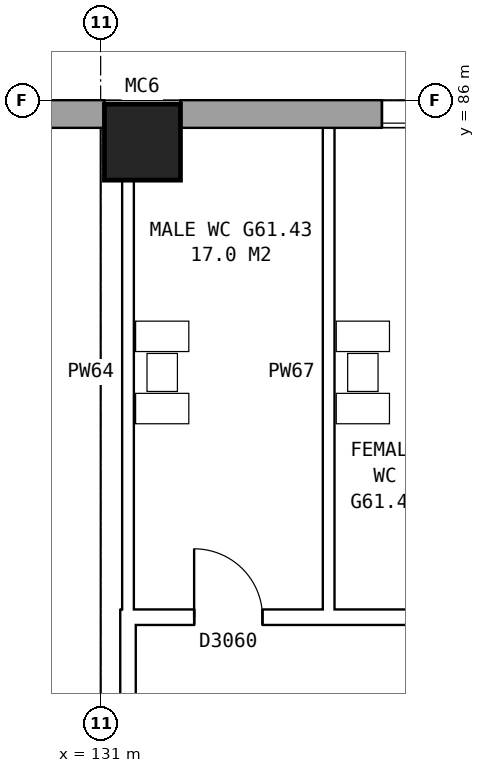
"""IFC4 building model, lengths in metres.
Left out: names, types, materials, properties, quantities, classifications, styles, units other than length and angle.
Written with IfcOpenShell. Run it as: python <this file> out.ifc"""

import sys

from ifc_helpers import new_model, si_unit, direction, frame, frame_2d, origin, origin_2d, place, context, subcontext, project, spatial, rectangle, hollow_rectangle, extrude, element, fill, save


model = new_model("IFC4")
c1 = context("Model", 3, precision=1e-05, world=origin(), true_north=direction((0.0, 1.0)))
c2 = subcontext(c1, "Body", "Model", "MODEL_VIEW")
j1 = project(units=[si_unit("LENGTHUNIT", "METRE"), si_unit("PLANEANGLEUNIT", "RADIAN")], contexts=[c1])
p1 = place(None, origin())
s1 = spatial("IfcSite", under=j1, at=p1, CompositionType="ELEMENT")
p2 = place(p1, origin())
s2 = spatial("IfcBuilding", under=s1, at=p2, CompositionType="ELEMENT")
p3 = place(p2, frame((0.0, 0.0, 215.2)))
s3 = spatial("IfcBuildingStorey", under=s2, at=p3, CompositionType="ELEMENT", Elevation=215.2)
p4 = place(p3, frame((131.55, 85.45, 0.0), z_axis=(0.0, 0.0, 1.0), x_axis=(1.0, 0.0, 0.0)))
e1 = element("IfcColumn", 1, at=p4, inside=s3, PredefinedType="COLUMN", context=c2, shape_type="SweptSolid", body=[
    extrude(hollow_rectangle(XDim=1.0, YDim=1.0, WallThickness=0.055, at=origin_2d()), origin(), (0.0, 0.0, 1.0), 6.2),
])
p5 = place(p3, frame((165.925, 85.82, 0.0), z_axis=(0.0, 0.0, 1.0), x_axis=(-1.0, 0.0, 0.0)))
e2 = element("IfcWall", 2, at=p5, inside=s3, PredefinedType="STANDARD", context=c2, shape_type="SweptSolid", body=[
    extrude(rectangle(XDim=33.875, YDim=0.36, at=frame_2d((16.938, 0.0))), origin(), (0.0, 0.0, 1.0), 5.6),
])
p6 = place(p5, frame((0.3, 0.0, 0.15)))
e3 = element("IfcOpeningElement", 3, at=p6, cuts=e2, PredefinedType="OPENING", context=c2, shape_type="SweptSolid", body=[
    extrude(rectangle(XDim=1.6, YDim=2.4, at=frame_2d((0.8, 1.2))), frame((0.0, 0.19, 0.0), z_axis=(0.0, -1.0, 0.0), x_axis=(1.0, 0.0, 0.0)), (0.0, 0.0, 1.0), 0.38),
])
p7 = place(p5, frame((2.2, 0.0, 0.15)))
e4 = element("IfcOpeningElement", 4, at=p7, cuts=e2, PredefinedType="OPENING", context=c2, shape_type="SweptSolid", body=[
    extrude(rectangle(XDim=1.6, YDim=2.4, at=frame_2d((0.8, 1.2))), frame((0.0, 0.19, 0.0), z_axis=(0.0, -1.0, 0.0), x_axis=(1.0, 0.0, 0.0)), (0.0, 0.0, 1.0), 0.38),
])
p8 = place(p5, frame((8.625, 0.0, 0.15)))
e5 = element("IfcOpeningElement", 5, at=p8, cuts=e2, PredefinedType="OPENING", context=c2, shape_type="SweptSolid", body=[
    extrude(rectangle(XDim=1.6, YDim=2.4, at=frame_2d((0.8, 1.2))), frame((0.0, 0.19, 0.0), z_axis=(0.0, -1.0, 0.0), x_axis=(1.0, 0.0, 0.0)), (0.0, 0.0, 1.0), 0.38),
])
p9 = place(p5, frame((11.625, 0.0, 0.15)))
e6 = element("IfcOpeningElement", 6, at=p9, cuts=e2, PredefinedType="OPENING", context=c2, shape_type="SweptSolid", body=[
    extrude(rectangle(XDim=1.6, YDim=2.4, at=frame_2d((0.8, 1.2))), frame((0.0, 0.19, 0.0), z_axis=(0.0, -1.0, 0.0), x_axis=(1.0, 0.0, 0.0)), (0.0, 0.0, 1.0), 0.38),
])
p10 = place(p5, frame((14.625, 0.0, 0.15)))
e7 = element("IfcOpeningElement", 7, at=p10, cuts=e2, PredefinedType="OPENING", context=c2, shape_type="SweptSolid", body=[
    extrude(rectangle(XDim=1.6, YDim=2.4, at=frame_2d((0.8, 1.2))), frame((0.0, 0.19, 0.0), z_axis=(0.0, -1.0, 0.0), x_axis=(1.0, 0.0, 0.0)), (0.0, 0.0, 1.0), 0.38),
])
p11 = place(p5, frame((17.625, 0.0, 0.15)))
e8 = element("IfcOpeningElement", 8, at=p11, cuts=e2, PredefinedType="OPENING", context=c2, shape_type="SweptSolid", body=[
    extrude(rectangle(XDim=1.6, YDim=2.4, at=frame_2d((0.8, 1.2))), frame((0.0, 0.19, 0.0), z_axis=(0.0, -1.0, 0.0), x_axis=(1.0, 0.0, 0.0)), (0.0, 0.0, 1.0), 0.38),
])
p12 = place(p5, frame((20.625, 0.0, 0.15)))
e9 = element("IfcOpeningElement", 9, at=p12, cuts=e2, PredefinedType="OPENING", context=c2, shape_type="SweptSolid", body=[
    extrude(rectangle(XDim=1.6, YDim=2.4, at=frame_2d((0.8, 1.2))), frame((0.0, 0.19, 0.0), z_axis=(0.0, -1.0, 0.0), x_axis=(1.0, 0.0, 0.0)), (0.0, 0.0, 1.0), 0.38),
])
p13 = place(p5, frame((23.625, 0.0, 0.15)))
e10 = element("IfcOpeningElement", 10, at=p13, cuts=e2, PredefinedType="OPENING", context=c2, shape_type="SweptSolid", body=[
    extrude(rectangle(XDim=1.6, YDim=2.4, at=frame_2d((0.8, 1.2))), frame((0.0, 0.19, 0.0), z_axis=(0.0, -1.0, 0.0), x_axis=(1.0, 0.0, 0.0)), (0.0, 0.0, 1.0), 0.38),
])
p14 = place(p5, frame((29.625, 0.0, 0.15)))
e11 = element("IfcOpeningElement", 11, at=p14, cuts=e2, PredefinedType="OPENING", context=c2, shape_type="SweptSolid", body=[
    extrude(rectangle(XDim=1.6, YDim=2.4, at=frame_2d((0.8, 1.2))), frame((0.0, 0.19, 0.0), z_axis=(0.0, -1.0, 0.0), x_axis=(1.0, 0.0, 0.0)), (0.0, 0.0, 1.0), 0.38),
])
p15 = place(p5, frame((6.25, 0.0, 0.15)))
e12 = element("IfcOpeningElement", 12, at=p15, cuts=e2, PredefinedType="OPENING", context=c2, shape_type="SweptSolid", body=[
    extrude(rectangle(XDim=0.9, YDim=2.4, at=frame_2d((0.45, 1.2))), frame((0.0, 0.19, 0.0), z_axis=(0.0, -1.0, 0.0), x_axis=(1.0, 0.0, 0.0)), (0.0, 0.0, 1.0), 0.38),
])
p16 = place(p3, frame((131.05, 85.82, 0.0), z_axis=(0.0, 0.0, 1.0), x_axis=(-1.0, 0.0, 0.0)))
e13 = element("IfcWall", 13, at=p16, inside=s3, PredefinedType="STANDARD", context=c2, shape_type="SweptSolid", body=[
    extrude(rectangle(XDim=55.1, YDim=0.36, at=frame_2d((27.55, 0.0))), origin(), (0.0, 0.0, 1.0), 5.6),
])
p17 = place(p16, frame((0.969, 0.0, 0.15)))
e14 = element("IfcOpeningElement", 14, at=p17, cuts=e13, PredefinedType="OPENING", context=c2, shape_type="SweptSolid", body=[
    extrude(rectangle(XDim=1.6, YDim=2.4, at=frame_2d((0.8, 1.2))), frame((0.0, 0.19, 0.0), z_axis=(0.0, -1.0, 0.0), x_axis=(1.0, 0.0, 0.0)), (0.0, 0.0, 1.0), 0.38),
])
p18 = place(p16, frame((4.406, 0.0, 0.15)))
e15 = element("IfcOpeningElement", 15, at=p18, cuts=e13, PredefinedType="OPENING", context=c2, shape_type="SweptSolid", body=[
    extrude(rectangle(XDim=1.6, YDim=2.4, at=frame_2d((0.8, 1.2))), frame((0.0, 0.19, 0.0), z_axis=(0.0, -1.0, 0.0), x_axis=(1.0, 0.0, 0.0)), (0.0, 0.0, 1.0), 0.38),
])
p19 = place(p16, frame((7.844, 0.0, 0.15)))
e16 = element("IfcOpeningElement", 16, at=p19, cuts=e13, PredefinedType="OPENING", context=c2, shape_type="SweptSolid", body=[
    extrude(rectangle(XDim=1.6, YDim=2.4, at=frame_2d((0.8, 1.2))), frame((0.0, 0.19, 0.0), z_axis=(0.0, -1.0, 0.0), x_axis=(1.0, 0.0, 0.0)), (0.0, 0.0, 1.0), 0.38),
])
p20 = place(p16, frame((11.281, 0.0, 0.15)))
e17 = element("IfcOpeningElement", 17, at=p20, cuts=e13, PredefinedType="OPENING", context=c2, shape_type="SweptSolid", body=[
    extrude(rectangle(XDim=1.6, YDim=2.4, at=frame_2d((0.8, 1.2))), frame((0.0, 0.19, 0.0), z_axis=(0.0, -1.0, 0.0), x_axis=(1.0, 0.0, 0.0)), (0.0, 0.0, 1.0), 0.38),
])
p21 = place(p16, frame((14.719, 0.0, 0.15)))
e18 = element("IfcOpeningElement", 18, at=p21, cuts=e13, PredefinedType="OPENING", context=c2, shape_type="SweptSolid", body=[
    extrude(rectangle(XDim=1.6, YDim=2.4, at=frame_2d((0.8, 1.2))), frame((0.0, 0.19, 0.0), z_axis=(0.0, -1.0, 0.0), x_axis=(1.0, 0.0, 0.0)), (0.0, 0.0, 1.0), 0.38),
])
p22 = place(p16, frame((18.156, 0.0, 0.15)))
e19 = element("IfcOpeningElement", 19, at=p22, cuts=e13, PredefinedType="OPENING", context=c2, shape_type="SweptSolid", body=[
    extrude(rectangle(XDim=1.6, YDim=2.4, at=frame_2d((0.8, 1.2))), frame((0.0, 0.19, 0.0), z_axis=(0.0, -1.0, 0.0), x_axis=(1.0, 0.0, 0.0)), (0.0, 0.0, 1.0), 0.38),
])
p23 = place(p16, frame((21.594, 0.0, 0.15)))
e20 = element("IfcOpeningElement", 20, at=p23, cuts=e13, PredefinedType="OPENING", context=c2, shape_type="SweptSolid", body=[
    extrude(rectangle(XDim=1.6, YDim=2.4, at=frame_2d((0.8, 1.2))), frame((0.0, 0.19, 0.0), z_axis=(0.0, -1.0, 0.0), x_axis=(1.0, 0.0, 0.0)), (0.0, 0.0, 1.0), 0.38),
])
p24 = place(p16, frame((25.031, 0.0, 0.15)))
e21 = element("IfcOpeningElement", 21, at=p24, cuts=e13, PredefinedType="OPENING", context=c2, shape_type="SweptSolid", body=[
    extrude(rectangle(XDim=1.6, YDim=2.4, at=frame_2d((0.8, 1.2))), frame((0.0, 0.19, 0.0), z_axis=(0.0, -1.0, 0.0), x_axis=(1.0, 0.0, 0.0)), (0.0, 0.0, 1.0), 0.38),
])
p25 = place(p16, frame((28.469, 0.0, 0.15)))
e22 = element("IfcOpeningElement", 22, at=p25, cuts=e13, PredefinedType="OPENING", context=c2, shape_type="SweptSolid", body=[
    extrude(rectangle(XDim=1.6, YDim=2.4, at=frame_2d((0.8, 1.2))), frame((0.0, 0.19, 0.0), z_axis=(0.0, -1.0, 0.0), x_axis=(1.0, 0.0, 0.0)), (0.0, 0.0, 1.0), 0.38),
])
p26 = place(p16, frame((31.906, 0.0, 0.15)))
e23 = element("IfcOpeningElement", 23, at=p26, cuts=e13, PredefinedType="OPENING", context=c2, shape_type="SweptSolid", body=[
    extrude(rectangle(XDim=1.6, YDim=2.4, at=frame_2d((0.8, 1.2))), frame((0.0, 0.19, 0.0), z_axis=(0.0, -1.0, 0.0), x_axis=(1.0, 0.0, 0.0)), (0.0, 0.0, 1.0), 0.38),
])
p27 = place(p16, frame((35.344, 0.0, 0.15)))
e24 = element("IfcOpeningElement", 24, at=p27, cuts=e13, PredefinedType="OPENING", context=c2, shape_type="SweptSolid", body=[
    extrude(rectangle(XDim=1.6, YDim=2.4, at=frame_2d((0.8, 1.2))), frame((0.0, 0.19, 0.0), z_axis=(0.0, -1.0, 0.0), x_axis=(1.0, 0.0, 0.0)), (0.0, 0.0, 1.0), 0.38),
])
p28 = place(p16, frame((38.781, 0.0, 0.15)))
e25 = element("IfcOpeningElement", 25, at=p28, cuts=e13, PredefinedType="OPENING", context=c2, shape_type="SweptSolid", body=[
    extrude(rectangle(XDim=1.6, YDim=2.4, at=frame_2d((0.8, 1.2))), frame((0.0, 0.19, 0.0), z_axis=(0.0, -1.0, 0.0), x_axis=(1.0, 0.0, 0.0)), (0.0, 0.0, 1.0), 0.38),
])
p29 = place(p16, frame((42.219, 0.0, 0.15)))
e26 = element("IfcOpeningElement", 26, at=p29, cuts=e13, PredefinedType="OPENING", context=c2, shape_type="SweptSolid", body=[
    extrude(rectangle(XDim=1.6, YDim=2.4, at=frame_2d((0.8, 1.2))), frame((0.0, 0.19, 0.0), z_axis=(0.0, -1.0, 0.0), x_axis=(1.0, 0.0, 0.0)), (0.0, 0.0, 1.0), 0.38),
])
p30 = place(p16, frame((45.656, 0.0, 0.15)))
e27 = element("IfcOpeningElement", 27, at=p30, cuts=e13, PredefinedType="OPENING", context=c2, shape_type="SweptSolid", body=[
    extrude(rectangle(XDim=1.6, YDim=2.4, at=frame_2d((0.8, 1.2))), frame((0.0, 0.19, 0.0), z_axis=(0.0, -1.0, 0.0), x_axis=(1.0, 0.0, 0.0)), (0.0, 0.0, 1.0), 0.38),
])
p31 = place(p16, frame((49.094, 0.0, 0.15)))
e28 = element("IfcOpeningElement", 28, at=p31, cuts=e13, PredefinedType="OPENING", context=c2, shape_type="SweptSolid", body=[
    extrude(rectangle(XDim=1.6, YDim=2.4, at=frame_2d((0.8, 1.2))), frame((0.0, 0.19, 0.0), z_axis=(0.0, -1.0, 0.0), x_axis=(1.0, 0.0, 0.0)), (0.0, 0.0, 1.0), 0.38),
])
p32 = place(p16, frame((52.531, 0.0, 0.15)))
e29 = element("IfcOpeningElement", 29, at=p32, cuts=e13, PredefinedType="OPENING", context=c2, shape_type="SweptSolid", body=[
    extrude(rectangle(XDim=1.6, YDim=2.4, at=frame_2d((0.8, 1.2))), frame((0.0, 0.19, 0.0), z_axis=(0.0, -1.0, 0.0), x_axis=(1.0, 0.0, 0.0)), (0.0, 0.0, 1.0), 0.38),
])
p33 = place(p3, frame((131.26, 79.2, 0.0), z_axis=(0.0, 0.0, 1.0), x_axis=(1.0, 0.0, 0.0)))
e30 = element("IfcWall", 30, at=p33, inside=s3, PredefinedType="PARTITIONING", context=c2, shape_type="SweptSolid", body=[
    extrude(rectangle(XDim=37.5, YDim=0.2, at=frame_2d((18.75, 0.0))), origin(), (0.0, 0.0, 1.0), 5.6),
])
p34 = place(p33, frame((0.97, 0.0, 0.0)))
e31 = element("IfcOpeningElement", 31, at=p34, cuts=e30, PredefinedType="OPENING", context=c2, shape_type="SweptSolid", body=[
    extrude(rectangle(XDim=0.9, YDim=2.1, at=frame_2d((0.45, 1.05))), frame((0.0, 0.11, 0.0), z_axis=(0.0, -1.0, 0.0), x_axis=(1.0, 0.0, 0.0)), (0.0, 0.0, 1.0), 0.22),
])
p35 = place(p33, frame((3.79, 0.0, 0.0)))
e32 = element("IfcOpeningElement", 32, at=p35, cuts=e30, PredefinedType="OPENING", context=c2, shape_type="SweptSolid", body=[
    extrude(rectangle(XDim=0.9, YDim=2.1, at=frame_2d((0.45, 1.05))), frame((0.0, 0.11, 0.0), z_axis=(0.0, -1.0, 0.0), x_axis=(1.0, 0.0, 0.0)), (0.0, 0.0, 1.0), 0.22),
])
p36 = place(p33, frame((6.79, 0.0, 0.0)))
e33 = element("IfcOpeningElement", 33, at=p36, cuts=e30, PredefinedType="OPENING", context=c2, shape_type="SweptSolid", body=[
    extrude(rectangle(XDim=0.9, YDim=2.1, at=frame_2d((0.45, 1.05))), frame((0.0, 0.11, 0.0), z_axis=(0.0, -1.0, 0.0), x_axis=(1.0, 0.0, 0.0)), (0.0, 0.0, 1.0), 0.22),
])
p37 = place(p33, frame((9.79, 0.0, 0.0)))
e34 = element("IfcOpeningElement", 34, at=p37, cuts=e30, PredefinedType="OPENING", context=c2, shape_type="SweptSolid", body=[
    extrude(rectangle(XDim=0.9, YDim=2.1, at=frame_2d((0.45, 1.05))), frame((0.0, 0.11, 0.0), z_axis=(0.0, -1.0, 0.0), x_axis=(1.0, 0.0, 0.0)), (0.0, 0.0, 1.0), 0.22),
])
p38 = place(p33, frame((14.24, 0.0, 0.0)))
e35 = element("IfcOpeningElement", 35, at=p38, cuts=e30, PredefinedType="OPENING", context=c2, shape_type="SweptSolid", body=[
    extrude(rectangle(XDim=1.0, YDim=2.1, at=frame_2d((0.5, 1.05))), frame((0.0, 0.11, 0.0), z_axis=(0.0, -1.0, 0.0), x_axis=(1.0, 0.0, 0.0)), (0.0, 0.0, 1.0), 0.22),
])
p39 = place(p33, frame((21.74, 0.0, 0.0)))
e36 = element("IfcOpeningElement", 36, at=p39, cuts=e30, PredefinedType="OPENING", context=c2, shape_type="SweptSolid", body=[
    extrude(rectangle(XDim=1.0, YDim=2.1, at=frame_2d((0.5, 1.05))), frame((0.0, 0.11, 0.0), z_axis=(0.0, -1.0, 0.0), x_axis=(1.0, 0.0, 0.0)), (0.0, 0.0, 1.0), 0.22),
])
p40 = place(p33, frame((31.56, 0.0, 0.0)))
e37 = element("IfcOpeningElement", 37, at=p40, cuts=e30, PredefinedType="OPENING", context=c2, shape_type="SweptSolid", body=[
    extrude(rectangle(XDim=1.0, YDim=2.1, at=frame_2d((0.5, 1.05))), frame((0.0, 0.11, 0.0), z_axis=(0.0, -1.0, 0.0), x_axis=(1.0, 0.0, 0.0)), (0.0, 0.0, 1.0), 0.22),
])
p41 = place(p3, frame((131.36, 76.2, 0.0), z_axis=(0.0, 0.0, 1.0), x_axis=(0.0, 1.0, 0.0)))
e38 = element("IfcWall", 38, at=p41, inside=s3, PredefinedType="PARTITIONING", context=c2, shape_type="SweptSolid", body=[
    extrude(rectangle(XDim=3.1, YDim=0.2, at=frame_2d((1.55, 0.0))), origin(), (0.0, 0.0, 1.0), 5.6),
])
for number, where, z_axis, x_axis in (
    (39, (131.36, 79.1, 0.0), (0.0, 0.0, 1.0), (0.0, 1.0, 0.0)),
    (40, (134.0, 79.1, 0.0), (0.0, 0.0, 1.0), (0.0, 1.0, 0.0)),
):
    element("IfcWall", number, at=place(p3, frame(where, z_axis=z_axis, x_axis=x_axis)), inside=s3, PredefinedType="PLUMBINGWALL", context=c2, shape_type="SweptSolid", body=[
        extrude(rectangle(XDim=6.66, YDim=0.15, at=frame_2d((3.33, 0.0))), origin(), (0.0, 0.0, 1.0), 5.6),
    ])
p42 = place(p14, origin())
e41 = element("IfcWindow", 41, at=p42, inside=s3, PartitioningType="SINGLE_PANEL", PredefinedType="WINDOW", context=c2, shape_type="SweptSolid", body=[
    extrude(rectangle(XDim=1.6, YDim=2.4, at=frame_2d((0.8, 1.2))), frame((0.0, 0.15, 0.0), z_axis=(0.0, -1.0, 0.0), x_axis=(1.0, 0.0, 0.0)), (0.0, 0.0, 1.0), 0.06),
])
fill(e11, e41)
p43 = place(p34, origin())
e42 = element("IfcDoor", 42, at=p43, inside=s3, OperationType="SINGLE_SWING_LEFT", PredefinedType="DOOR", context=c2, shape_type="SweptSolid", body=[
    extrude(rectangle(XDim=0.9, YDim=2.1, at=frame_2d((0.45, 1.05))), frame((0.0, 0.025, 0.0), z_axis=(0.0, -1.0, 0.0), x_axis=(1.0, 0.0, 0.0)), (0.0, 0.0, 1.0), 0.05),
])
fill(e31, e42)
save(model, sys.argv[1])
